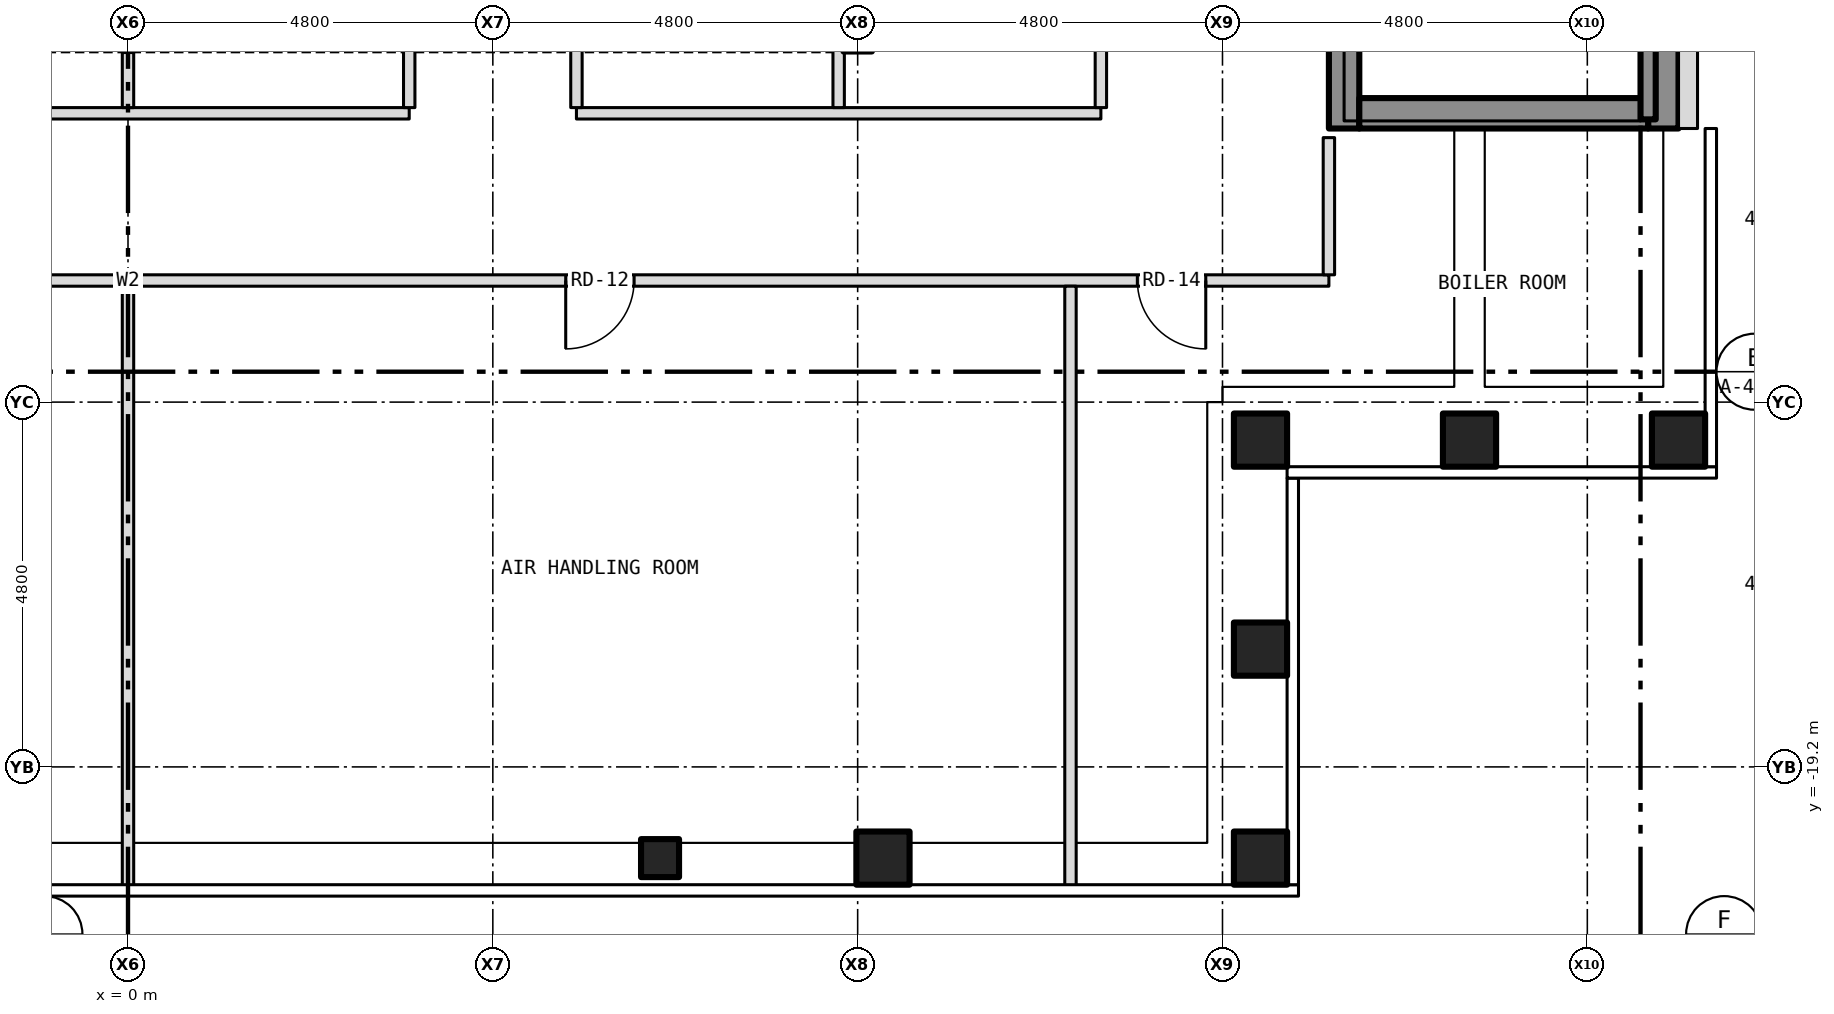
"""IFC4 building model, lengths in metres.
Left out: names, types, materials, properties, quantities, classifications, styles, units other than length and angle.
Written with IfcOpenShell. Run it as: python <this file> out.ifc"""

import sys

from ifc_helpers import new_model, si_unit, direction, frame, frame_2d, origin, origin_2d, place, context, subcontext, project, spatial, rectangle, hollow_rectangle, extrude, element, fill, save


model = new_model("IFC4")
c1 = context("Model", 3, precision=1e-05, world=origin(), true_north=direction((0.0, 1.0)))
c2 = subcontext(c1, "Body", "Model", "MODEL_VIEW")
j1 = project(units=[si_unit("LENGTHUNIT", "METRE"), si_unit("PLANEANGLEUNIT", "RADIAN")], contexts=[c1])
p1 = place(None, origin())
s1 = spatial("IfcSite", under=j1, at=p1, CompositionType="ELEMENT")
p2 = place(p1, origin())
s2 = spatial("IfcBuilding", under=s1, at=p2, CompositionType="ELEMENT")
p3 = place(p2, frame((0.0, 0.0, 236.5)))
s3 = spatial("IfcBuildingStorey", under=s2, at=p3, CompositionType="ELEMENT", Elevation=236.5)
for number, where, z_axis, x_axis in (
    (1, (9.933, -20.4, -0.3), (0.0, 0.0, 1.0), (1.0, 0.0, 0.0)),
    (2, (14.9, -20.4, -0.3), (0.0, 0.0, 1.0), (1.0, 0.0, 0.0)),
    (3, (20.4, -14.9, -0.3), (0.0, 0.0, 1.0), (1.0, 0.0, 0.0)),
    (4, (14.9, -14.9, -0.3), (0.0, 0.0, 1.0), (1.0, 0.0, 0.0)),
    (5, (14.9, -17.65, -0.3), (0.0, 0.0, 1.0), (1.0, 0.0, 0.0)),
    (6, (17.65, -14.9, -0.3), (0.0, 0.0, 1.0), (1.0, 0.0, 0.0)),
):
    element("IfcColumn", number, at=place(p3, frame(where, z_axis=z_axis, x_axis=x_axis)), inside=s3, PredefinedType="COLUMN", context=c2, shape_type="SweptSolid", body=[
        extrude(hollow_rectangle(XDim=0.7, YDim=0.7, WallThickness=0.04, at=origin_2d()), origin(), (0.0, 0.0, 1.0), 4.65),
    ])
p4 = place(p3, frame((7.0, -20.4, -0.3), z_axis=(0.0, 0.0, 1.0), x_axis=(1.0, 0.0, 0.0)))
e7 = element("IfcColumn", 7, at=p4, inside=s3, PredefinedType="COLUMN", context=c2, shape_type="SweptSolid", body=[
    extrude(hollow_rectangle(XDim=0.5, YDim=0.5, WallThickness=0.03, at=origin_2d()), origin(), (0.0, 0.0, 1.0), 4.65),
])
p5 = place(p3, frame((16.0, -10.8, 0.0), z_axis=(0.0, 0.0, 1.0), x_axis=(0.0, 1.0, 0.0)))
e8 = element("IfcWall", 8, at=p5, inside=s3, PredefinedType="SHEAR", context=c2, shape_type="SweptSolid", body=[
    extrude(rectangle(XDim=21.6, YDim=0.4, at=frame_2d((10.8, 0.0))), origin(), (0.0, 0.0, 1.0), 3.9),
])
p6 = place(p5, frame((9.4, 0.0, 0.0)))
e9 = element("IfcOpeningElement", 9, at=p6, cuts=e8, PredefinedType="OPENING", context=c2, shape_type="SweptSolid", body=[
    extrude(rectangle(XDim=1.1, YDim=2.1, at=frame_2d((0.55, 1.05))), frame((0.0, 0.212, 0.0), z_axis=(0.0, -1.0, 0.0), x_axis=(1.0, 0.0, 0.0)), (0.0, 0.0, 1.0), 0.424),
])
p7 = place(p5, frame((11.5, 0.0, 0.0)))
e10 = element("IfcOpeningElement", 10, at=p7, cuts=e8, PredefinedType="OPENING", context=c2, shape_type="SweptSolid", body=[
    extrude(rectangle(XDim=1.1, YDim=2.1, at=frame_2d((0.55, 1.05))), frame((0.0, 0.212, 0.0), z_axis=(0.0, -1.0, 0.0), x_axis=(1.0, 0.0, 0.0)), (0.0, 0.0, 1.0), 0.424),
])
p8 = place(p5, frame((13.6, 0.0, 0.0)))
e11 = element("IfcOpeningElement", 11, at=p8, cuts=e8, PredefinedType="OPENING", context=c2, shape_type="SweptSolid", body=[
    extrude(rectangle(XDim=1.1, YDim=2.1, at=frame_2d((0.55, 1.05))), frame((0.0, 0.212, 0.0), z_axis=(0.0, -1.0, 0.0), x_axis=(1.0, 0.0, 0.0)), (0.0, 0.0, 1.0), 0.424),
])
p9 = place(p5, frame((15.7, 0.0, 0.0)))
e12 = element("IfcOpeningElement", 12, at=p9, cuts=e8, PredefinedType="OPENING", context=c2, shape_type="SweptSolid", body=[
    extrude(rectangle(XDim=1.1, YDim=2.1, at=frame_2d((0.55, 1.05))), frame((0.0, 0.212, 0.0), z_axis=(0.0, -1.0, 0.0), x_axis=(1.0, 0.0, 0.0)), (0.0, 0.0, 1.0), 0.424),
])
p10 = place(p5, frame((17.8, 0.0, 0.0)))
e13 = element("IfcOpeningElement", 13, at=p10, cuts=e8, PredefinedType="OPENING", context=c2, shape_type="SweptSolid", body=[
    extrude(rectangle(XDim=1.1, YDim=2.1, at=frame_2d((0.55, 1.05))), frame((0.0, 0.212, 0.0), z_axis=(0.0, -1.0, 0.0), x_axis=(1.0, 0.0, 0.0)), (0.0, 0.0, 1.0), 0.424),
])
p11 = place(p5, frame((5.642, 0.0, 0.0)))
e14 = element("IfcOpeningElement", 14, at=p11, cuts=e8, PredefinedType="OPENING", context=c2, shape_type="SweptSolid", body=[
    extrude(rectangle(XDim=1.1, YDim=2.1, at=frame_2d((0.55, 1.05))), frame((0.0, 0.212, 0.0), z_axis=(0.0, -1.0, 0.0), x_axis=(1.0, 0.0, 0.0)), (0.0, 0.0, 1.0), 0.424),
])
p12 = place(p5, frame((7.5, 0.0, 0.0)))
e15 = element("IfcOpeningElement", 15, at=p12, cuts=e8, PredefinedType="OPENING", context=c2, shape_type="SweptSolid", body=[
    extrude(rectangle(XDim=1.1, YDim=2.1, at=frame_2d((0.55, 1.05))), frame((0.0, 0.212, 0.0), z_axis=(0.0, -1.0, 0.0), x_axis=(1.0, 0.0, 0.0)), (0.0, 0.0, 1.0), 0.424),
])
p13 = place(p5, frame((20.0, 0.0, 0.0)))
e16 = element("IfcOpeningElement", 16, at=p13, cuts=e8, PredefinedType="OPENING", context=c2, shape_type="SweptSolid", body=[
    extrude(rectangle(XDim=0.9, YDim=2.1, at=frame_2d((0.45, 1.05))), frame((0.0, 0.212, 0.0), z_axis=(0.0, -1.0, 0.0), x_axis=(1.0, 0.0, 0.0)), (0.0, 0.0, 1.0), 0.424),
])
p14 = place(p3, frame((20.2, -10.8, 0.0), z_axis=(0.0, 0.0, 1.0), x_axis=(0.0, 1.0, 0.0)))
e17 = element("IfcWall", 17, at=p14, inside=s3, PredefinedType="SHEAR", context=c2, shape_type="SweptSolid", body=[
    extrude(rectangle(XDim=21.6, YDim=0.4, at=frame_2d((10.8, 0.0))), origin(), (0.0, 0.0, 1.0), 3.9),
])
p15 = place(p3, frame((16.2, -10.6, 0.0), z_axis=(0.0, 0.0, 1.0), x_axis=(1.0, 0.0, 0.0)))
e18 = element("IfcWall", 18, at=p15, inside=s3, PredefinedType="SHEAR", context=c2, shape_type="SweptSolid", body=[
    extrude(rectangle(XDim=3.8, YDim=0.4, at=frame_2d((1.9, 0.0))), origin(), (0.0, 0.0, 1.0), 3.9),
])
p16 = place(p3, frame((20.525, -10.8, 0.0), z_axis=(0.0, 0.0, 1.0), x_axis=(0.0, 1.0, 0.0)))
e19 = element("IfcWall", 19, at=p16, inside=s3, PredefinedType="SOLIDWALL", context=c2, shape_type="SweptSolid", body=[
    extrude(rectangle(XDim=21.6, YDim=0.25, at=frame_2d((10.8, 0.0))), origin(), (0.0, 0.0, 1.0), 4.5),
])
p17 = place(p16, frame((3.0, 0.0, 2.2)))
e20 = element("IfcOpeningElement", 20, at=p17, cuts=e19, PredefinedType="OPENING", context=c2, shape_type="SweptSolid", body=[
    extrude(rectangle(XDim=1.2, YDim=0.6, at=frame_2d((0.6, 0.3))), frame((0.0, 0.137, 0.0), z_axis=(0.0, -1.0, 0.0), x_axis=(1.0, 0.0, 0.0)), (0.0, 0.0, 1.0), 0.274),
])
p18 = place(p16, frame((7.8, 0.0, 2.2)))
e21 = element("IfcOpeningElement", 21, at=p18, cuts=e19, PredefinedType="OPENING", context=c2, shape_type="SweptSolid", body=[
    extrude(rectangle(XDim=1.2, YDim=0.6, at=frame_2d((0.6, 0.3))), frame((0.0, 0.137, 0.0), z_axis=(0.0, -1.0, 0.0), x_axis=(1.0, 0.0, 0.0)), (0.0, 0.0, 1.0), 0.274),
])
p19 = place(p16, frame((12.6, 0.0, 2.2)))
e22 = element("IfcOpeningElement", 22, at=p19, cuts=e19, PredefinedType="OPENING", context=c2, shape_type="SweptSolid", body=[
    extrude(rectangle(XDim=1.2, YDim=0.6, at=frame_2d((0.6, 0.3))), frame((0.0, 0.137, 0.0), z_axis=(0.0, -1.0, 0.0), x_axis=(1.0, 0.0, 0.0)), (0.0, 0.0, 1.0), 0.274),
])
p20 = place(p16, frame((17.4, 0.0, 2.2)))
e23 = element("IfcOpeningElement", 23, at=p20, cuts=e19, PredefinedType="OPENING", context=c2, shape_type="SweptSolid", body=[
    extrude(rectangle(XDim=1.2, YDim=0.6, at=frame_2d((0.6, 0.3))), frame((0.0, 0.137, 0.0), z_axis=(0.0, -1.0, 0.0), x_axis=(1.0, 0.0, 0.0)), (0.0, 0.0, 1.0), 0.274),
])
p21 = place(p3, frame((-15.8, -12.8, 0.0), z_axis=(0.0, 0.0, 1.0), x_axis=(1.0, 0.0, 0.0)))
e24 = element("IfcWall", 24, at=p21, inside=s3, PredefinedType="PARTITIONING", context=c2, shape_type="SweptSolid", body=[
    extrude(rectangle(XDim=31.6, YDim=0.15, at=frame_2d((15.8, 0.0))), origin(), (0.0, 0.0, 1.0), 4.35),
])
p22 = place(p21, frame((9.142, 0.0, 0.0)))
e25 = element("IfcOpeningElement", 25, at=p22, cuts=e24, PredefinedType="OPENING", context=c2, shape_type="SweptSolid", body=[
    extrude(rectangle(XDim=0.9, YDim=2.1, at=frame_2d((0.45, 1.05))), frame((0.0, 0.087, 0.0), z_axis=(0.0, -1.0, 0.0), x_axis=(1.0, 0.0, 0.0)), (0.0, 0.0, 1.0), 0.174),
])
p23 = place(p21, frame((21.559, 0.0, 0.0)))
e26 = element("IfcOpeningElement", 26, at=p23, cuts=e24, PredefinedType="OPENING", context=c2, shape_type="SweptSolid", body=[
    extrude(rectangle(XDim=0.9, YDim=2.1, at=frame_2d((0.45, 1.05))), frame((0.0, 0.087, 0.0), z_axis=(0.0, -1.0, 0.0), x_axis=(1.0, 0.0, 0.0)), (0.0, 0.0, 1.0), 0.174),
])
p24 = place(p21, frame((1.63, 0.0, 0.0)))
e27 = element("IfcOpeningElement", 27, at=p24, cuts=e24, PredefinedType="OPENING", context=c2, shape_type="SweptSolid", body=[
    extrude(rectangle(XDim=0.9, YDim=2.1, at=frame_2d((0.45, 1.05))), frame((0.0, 0.087, 0.0), z_axis=(0.0, -1.0, 0.0), x_axis=(1.0, 0.0, 0.0)), (0.0, 0.0, 1.0), 0.174),
])
p25 = place(p21, frame((29.08, 0.0, 0.0)))
e28 = element("IfcOpeningElement", 28, at=p25, cuts=e24, PredefinedType="OPENING", context=c2, shape_type="SweptSolid", body=[
    extrude(rectangle(XDim=0.9, YDim=2.1, at=frame_2d((0.45, 1.05))), frame((0.0, 0.087, 0.0), z_axis=(0.0, -1.0, 0.0), x_axis=(1.0, 0.0, 0.0)), (0.0, 0.0, 1.0), 0.174),
])
p26 = place(p3, frame((-3.7, -10.6, 0.0), z_axis=(0.0, 0.0, 1.0), x_axis=(1.0, 0.0, 0.0)))
e29 = element("IfcWall", 29, at=p26, inside=s3, PredefinedType="PARTITIONING", context=c2, shape_type="SweptSolid", body=[
    extrude(rectangle(XDim=7.4, YDim=0.15, at=frame_2d((3.7, 0.0))), origin(), (0.0, 0.0, 1.0), 4.35),
])
p27 = place(p3, frame((5.9, -10.6, 0.0), z_axis=(0.0, 0.0, 1.0), x_axis=(1.0, 0.0, 0.0)))
e30 = element("IfcWall", 30, at=p27, inside=s3, PredefinedType="PARTITIONING", context=c2, shape_type="SweptSolid", body=[
    extrude(rectangle(XDim=6.9, YDim=0.15, at=frame_2d((3.45, 0.0))), origin(), (0.0, 0.0, 1.0), 4.35),
])
p28 = place(p3, frame((0.0, -20.78, 0.0), z_axis=(0.0, 0.0, 1.0), x_axis=(0.0, 1.0, 0.0)))
e31 = element("IfcWall", 31, at=p28, inside=s3, PredefinedType="PARTITIONING", context=c2, shape_type="SweptSolid", body=[
    extrude(rectangle(XDim=7.905, YDim=0.15, at=frame_2d((3.953, 0.0))), origin(), (0.0, 0.0, 1.0), 3.728),
])
p29 = place(p3, frame((0.0, -10.525, 0.0), z_axis=(0.0, 0.0, 1.0), x_axis=(0.0, 1.0, 0.0)))
e32 = element("IfcWall", 32, at=p29, inside=s3, PredefinedType="PARTITIONING", context=c2, shape_type="SweptSolid", body=[
    extrude(rectangle(XDim=0.725, YDim=0.15, at=frame_2d((0.362, 0.0))), origin(), (0.0, 0.0, 1.0), 3.728),
])
p30 = place(p3, frame((3.7, -10.525, 0.0), z_axis=(0.0, 0.0, 1.0), x_axis=(0.0, 1.0, 0.0)))
e33 = element("IfcWall", 33, at=p30, inside=s3, PredefinedType="PARTITIONING", context=c2, shape_type="SweptSolid", body=[
    extrude(rectangle(XDim=14.15, YDim=0.15, at=frame_2d((7.075, 0.0))), origin(), (0.0, 0.0, 1.0), 4.35),
])
p31 = place(p30, frame((3.05, 0.0, 0.0)))
e34 = element("IfcOpeningElement", 34, at=p31, cuts=e33, PredefinedType="OPENING", context=c2, shape_type="SweptSolid", body=[
    extrude(rectangle(XDim=0.9, YDim=2.1, at=frame_2d((0.45, 1.05))), frame((0.0, 0.087, 0.0), z_axis=(0.0, -1.0, 0.0), x_axis=(1.0, 0.0, 0.0)), (0.0, 0.0, 1.0), 0.174),
])
p32 = place(p30, frame((10.8, 0.0, 0.0)))
e35 = element("IfcOpeningElement", 35, at=p32, cuts=e33, PredefinedType="OPENING", context=c2, shape_type="SweptSolid", body=[
    extrude(rectangle(XDim=0.9, YDim=2.1, at=frame_2d((0.45, 1.05))), frame((0.0, 0.087, 0.0), z_axis=(0.0, -1.0, 0.0), x_axis=(1.0, 0.0, 0.0)), (0.0, 0.0, 1.0), 0.174),
])
p33 = place(p3, frame((5.9, -10.525, 0.0), z_axis=(0.0, 0.0, 1.0), x_axis=(0.0, 1.0, 0.0)))
e36 = element("IfcWall", 36, at=p33, inside=s3, PredefinedType="PARTITIONING", context=c2, shape_type="SweptSolid", body=[
    extrude(rectangle(XDim=14.15, YDim=0.15, at=frame_2d((7.075, 0.0))), origin(), (0.0, 0.0, 1.0), 4.35),
])
p34 = place(p33, frame((3.05, 0.0, 0.0)))
e37 = element("IfcOpeningElement", 37, at=p34, cuts=e36, PredefinedType="OPENING", context=c2, shape_type="SweptSolid", body=[
    extrude(rectangle(XDim=0.9, YDim=2.1, at=frame_2d((0.45, 1.05))), frame((0.0, 0.087, 0.0), z_axis=(0.0, -1.0, 0.0), x_axis=(1.0, 0.0, 0.0)), (0.0, 0.0, 1.0), 0.174),
])
p35 = place(p33, frame((10.8, 0.0, 0.0)))
e38 = element("IfcOpeningElement", 38, at=p35, cuts=e36, PredefinedType="OPENING", context=c2, shape_type="SweptSolid", body=[
    extrude(rectangle(XDim=0.9, YDim=2.1, at=frame_2d((0.45, 1.05))), frame((0.0, 0.087, 0.0), z_axis=(0.0, -1.0, 0.0), x_axis=(1.0, 0.0, 0.0)), (0.0, 0.0, 1.0), 0.174),
])
p36 = place(p3, frame((9.35, -10.525, 0.0), z_axis=(0.0, 0.0, 1.0), x_axis=(0.0, 1.0, 0.0)))
e39 = element("IfcWall", 39, at=p36, inside=s3, PredefinedType="PARTITIONING", context=c2, shape_type="SweptSolid", body=[
    extrude(rectangle(XDim=7.0, YDim=0.15, at=frame_2d((3.5, 0.0))), origin(), (0.0, 0.0, 1.0), 4.35),
])
p37 = place(p3, frame((12.4, -20.78, 0.0), z_axis=(0.0, 0.0, 1.0), x_axis=(0.0, 1.0, 0.0)))
e40 = element("IfcWall", 40, at=p37, inside=s3, PredefinedType="PARTITIONING", context=c2, shape_type="SweptSolid", body=[
    extrude(rectangle(XDim=7.905, YDim=0.15, at=frame_2d((3.953, 0.0))), origin(), (0.0, 0.0, 1.0), 4.35),
])
p38 = place(p3, frame((12.8, -10.525, 0.0), z_axis=(0.0, 0.0, 1.0), x_axis=(0.0, 1.0, 0.0)))
e41 = element("IfcWall", 41, at=p38, inside=s3, PredefinedType="PARTITIONING", context=c2, shape_type="SweptSolid", body=[
    extrude(rectangle(XDim=8.525, YDim=0.15, at=frame_2d((4.262, 0.0))), origin(), (0.0, 0.0, 1.0), 4.35),
])
p39 = place(p38, frame((3.05, 0.0, 0.0)))
e42 = element("IfcOpeningElement", 42, at=p39, cuts=e41, PredefinedType="OPENING", context=c2, shape_type="SweptSolid", body=[
    extrude(rectangle(XDim=0.9, YDim=2.1, at=frame_2d((0.45, 1.05))), frame((0.0, 0.087, 0.0), z_axis=(0.0, -1.0, 0.0), x_axis=(1.0, 0.0, 0.0)), (0.0, 0.0, 1.0), 0.174),
])
p40 = place(p3, frame((15.8, -12.725, 0.0), z_axis=(0.0, 0.0, 1.0), x_axis=(0.0, 1.0, 0.0)))
e43 = element("IfcWall", 43, at=p40, inside=s3, PredefinedType="PARTITIONING", context=c2, shape_type="SweptSolid", body=[
    extrude(rectangle(XDim=1.805, YDim=0.15, at=frame_2d((0.903, 0.0))), origin(), (0.0, 0.0, 1.0), 4.35),
])
p41 = place(p3, frame((20.0, -10.68, 0.0), z_axis=(0.0, 0.0, 1.0), x_axis=(0.0, 1.0, 0.0)))
e44 = element("IfcWall", 44, at=p41, inside=s3, PredefinedType="SHEAR", context=c2, shape_type="SweptSolid", body=[
    extrude(rectangle(XDim=6.98, YDim=0.2, at=frame_2d((3.49, 0.0))), origin(), (0.0, 0.0, 1.0), 3.9),
])
p42 = place(p23, origin())
e45 = element("IfcDoor", 45, at=p42, inside=s3, OperationType="SINGLE_SWING_LEFT", PredefinedType="DOOR", context=c2, shape_type="SweptSolid", body=[
    extrude(rectangle(XDim=0.9, YDim=2.1, at=frame_2d((0.45, 1.05))), frame((0.0, 0.025, 0.0), z_axis=(0.0, -1.0, 0.0), x_axis=(1.0, 0.0, 0.0)), (0.0, 0.0, 1.0), 0.05),
])
fill(e26, e45)
p43 = place(p25, origin())
e46 = element("IfcDoor", 46, at=p43, inside=s3, OperationType="SINGLE_SWING_RIGHT", PredefinedType="DOOR", context=c2, shape_type="SweptSolid", body=[
    extrude(rectangle(XDim=0.9, YDim=2.1, at=frame_2d((0.45, 1.05))), frame((0.0, 0.025, 0.0), z_axis=(0.0, -1.0, 0.0), x_axis=(1.0, 0.0, 0.0)), (0.0, 0.0, 1.0), 0.05),
])
fill(e28, e46)
save(model, sys.argv[1])
